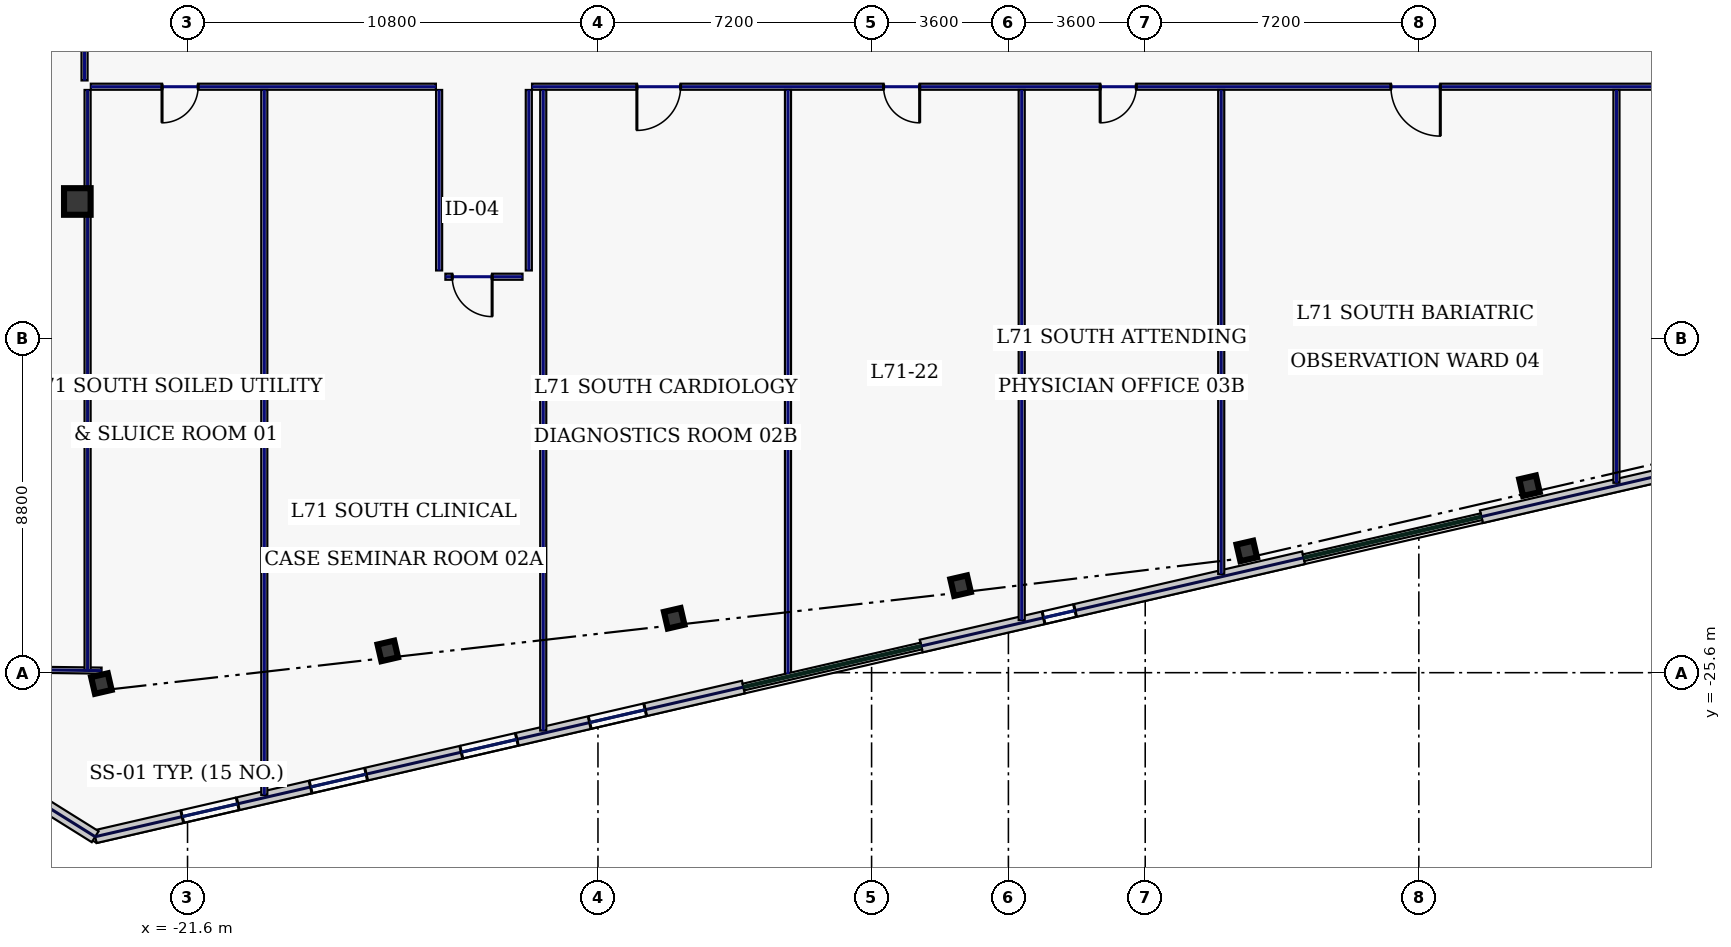
"""IFC4 building model, lengths in metres.
Left out: names, types, materials, properties, quantities, classifications, styles, units other than length and angle.
Written with IfcOpenShell. Run it as: python <this file> out.ifc"""

import sys

from ifc_helpers import new_model, si_unit, direction, frame, frame_2d, origin, origin_2d, place, context, subcontext, project, spatial, rectangle, hollow_rectangle, extrude, element, fill, save


model = new_model("IFC4")
c1 = context("Model", 3, precision=1e-05, world=origin(), true_north=direction((0.0, 1.0)))
c2 = subcontext(c1, "Body", "Model", "MODEL_VIEW")
j1 = project(units=[si_unit("LENGTHUNIT", "METRE"), si_unit("PLANEANGLEUNIT", "RADIAN")], contexts=[c1])
p1 = place(None, origin())
s1 = spatial("IfcSite", under=j1, at=p1, CompositionType="ELEMENT")
p2 = place(p1, origin())
s2 = spatial("IfcBuilding", under=s1, at=p2, CompositionType="ELEMENT")
p3 = place(p2, frame((0.0, 0.0, 305.0)))
s3 = spatial("IfcBuildingStorey", under=s2, at=p3, CompositionType="ELEMENT", Elevation=305.0)
p4 = place(p3, frame((-24.5, -13.2, 0.0), z_axis=(0.0, 0.0, 1.0), x_axis=(1.0, 0.0, 0.0)))
e1 = element("IfcColumn", 1, at=p4, inside=s3, PredefinedType="COLUMN", context=c2, shape_type="SweptSolid", body=[
    extrude(hollow_rectangle(XDim=0.7, YDim=0.7, WallThickness=0.032, at=origin_2d()), origin(), (0.0, 0.0, 1.0), 3.74),
])
for number, where, z_axis, x_axis in (
    (2, (-23.867, -25.886, 0.0), (0.0, 0.0, 1.0), (0.974, 0.225, 0.0)),
    (3, (-16.33, -25.027, 0.0), (0.0, 0.0, 1.0), (0.974, 0.225, 0.0)),
    (4, (-8.794, -24.168, 0.0), (0.0, 0.0, 1.0), (0.974, 0.225, 0.0)),
    (5, (-1.258, -23.31, 0.0), (0.0, 0.0, 1.0), (0.974, 0.225, 0.0)),
    (6, (6.273, -22.397, 0.0), (0.0, 0.0, 1.0), (0.974, 0.225, 0.0)),
    (7, (13.711, -20.68, 0.0), (0.0, 0.0, 1.0), (0.974, 0.225, 0.0)),
):
    element("IfcColumn", number, at=place(p3, frame(where, z_axis=z_axis, x_axis=x_axis)), inside=s3, PredefinedType="COLUMN", context=c2, shape_type="SweptSolid", body=[
        extrude(hollow_rectangle(XDim=0.45, YDim=0.45, WallThickness=0.022, at=origin_2d()), origin(), (0.0, 0.0, 1.0), 3.74),
    ])
p5 = place(p3, frame((-24.03, -29.916, 0.0), z_axis=(0.0, 0.0, 1.0), x_axis=(0.974370978061, 0.224947098473, 0.0)))
e8 = element("IfcWall", 8, at=p5, inside=s3, PredefinedType="STANDARD", context=c2, shape_type="SweptSolid", body=[
    extrude(rectangle(XDim=17.506, YDim=0.34, at=frame_2d((8.753, 0.0))), origin(), (0.0, 0.0, 1.0), 3.74),
])
p6 = place(p5, frame((2.35, 0.0, 0.9)))
e9 = element("IfcOpeningElement", 9, at=p6, cuts=e8, PredefinedType="OPENING", context=c2, shape_type="SweptSolid", body=[
    extrude(rectangle(XDim=1.5, YDim=2.0, at=frame_2d((0.75, 1.0))), frame((0.0, 0.18, 0.0), z_axis=(0.0, -1.0, 0.0), x_axis=(1.0, 0.0, 0.0)), (0.0, 0.0, 1.0), 0.36),
])
p7 = place(p5, frame((5.817, 0.0, 0.9)))
e10 = element("IfcOpeningElement", 10, at=p7, cuts=e8, PredefinedType="OPENING", context=c2, shape_type="SweptSolid", body=[
    extrude(rectangle(XDim=1.5, YDim=2.0, at=frame_2d((0.75, 1.0))), frame((0.0, 0.18, 0.0), z_axis=(0.0, -1.0, 0.0), x_axis=(1.0, 0.0, 0.0)), (0.0, 0.0, 1.0), 0.36),
])
p8 = place(p5, frame((9.886, 0.0, 0.9)))
e11 = element("IfcOpeningElement", 11, at=p8, cuts=e8, PredefinedType="OPENING", context=c2, shape_type="SweptSolid", body=[
    extrude(rectangle(XDim=1.5, YDim=2.0, at=frame_2d((0.75, 1.0))), frame((0.0, 0.18, 0.0), z_axis=(0.0, -1.0, 0.0), x_axis=(1.0, 0.0, 0.0)), (0.0, 0.0, 1.0), 0.36),
])
p9 = place(p5, frame((13.353, 0.0, 0.9)))
e12 = element("IfcOpeningElement", 12, at=p9, cuts=e8, PredefinedType="OPENING", context=c2, shape_type="SweptSolid", body=[
    extrude(rectangle(XDim=1.5, YDim=2.0, at=frame_2d((0.75, 1.0))), frame((0.0, 0.18, 0.0), z_axis=(0.0, -1.0, 0.0), x_axis=(1.0, 0.0, 0.0)), (0.0, 0.0, 1.0), 0.36),
])
p10 = place(p3, frame((-2.295, -24.898, 0.0), z_axis=(0.0, 0.0, 1.0), x_axis=(0.974370872906, 0.224947553958, 0.0)))
e13 = element("IfcWall", 13, at=p10, inside=s3, PredefinedType="STANDARD", context=c2, shape_type="SweptSolid", body=[
    extrude(rectangle(XDim=10.328, YDim=0.34, at=frame_2d((5.164, 0.0))), origin(), (0.0, 0.0, 1.0), 3.74),
])
p11 = place(p10, frame((3.305, 0.0, 0.9)))
e14 = element("IfcOpeningElement", 14, at=p11, cuts=e13, PredefinedType="OPENING", context=c2, shape_type="SweptSolid", body=[
    extrude(rectangle(XDim=0.85, YDim=1.85, at=frame_2d((0.425, 0.925))), frame((0.0, 0.18, 0.0), z_axis=(0.0, -1.0, 0.0), x_axis=(1.0, 0.0, 0.0)), (0.0, 0.0, 1.0), 0.36),
])
p12 = place(p3, frame((12.445, -21.495, 0.0), z_axis=(0.0, 0.0, 1.0), x_axis=(0.974369392164, 0.224953967767, 0.0)))
e15 = element("IfcWall", 15, at=p12, inside=s3, PredefinedType="STANDARD", context=c2, shape_type="SweptSolid", body=[
    extrude(rectangle(XDim=17.366, YDim=0.34, at=frame_2d((8.683, 0.0))), origin(), (0.0, 0.0, 1.0), 3.74),
])
p13 = place(p12, frame((6.19, 0.0, 0.22)))
e16 = element("IfcOpeningElement", 16, at=p13, cuts=e15, PredefinedType="OPENING", context=c2, shape_type="SweptSolid", body=[
    extrude(rectangle(XDim=1.6, YDim=1.2, at=frame_2d((0.8, 0.6))), frame((0.0, 0.18, 0.0), z_axis=(0.0, -1.0, 0.0), x_axis=(1.0, 0.0, 0.0)), (0.0, 0.0, 1.0), 0.36),
])
p14 = place(p12, frame((13.825, 0.0, 0.22)))
e17 = element("IfcOpeningElement", 17, at=p14, cuts=e15, PredefinedType="OPENING", context=c2, shape_type="SweptSolid", body=[
    extrude(rectangle(XDim=1.6, YDim=1.2, at=frame_2d((0.8, 0.6))), frame((0.0, 0.18, 0.0), z_axis=(0.0, -1.0, 0.0), x_axis=(1.0, 0.0, 0.0)), (0.0, 0.0, 1.0), 0.36),
])
p15 = place(p3, frame((-29.343, -26.596, 0.0), z_axis=(0.0, 0.0, 1.0), x_axis=(0.848037708252, -0.529935887993, 0.0)))
e18 = element("IfcWall", 18, at=p15, inside=s3, PredefinedType="STANDARD", context=c2, shape_type="SweptSolid", body=[
    extrude(rectangle(XDim=6.265, YDim=0.34, at=frame_2d((3.133, 0.0))), origin(), (0.0, 0.0, 1.0), 3.74),
])
p16 = place(p3, frame((-28.994, -25.479, 0.0), z_axis=(0.0, 0.0, 1.0), x_axis=(0.999915052546, -0.01303409726, 0.0)))
e19 = element("IfcWall", 19, at=p16, inside=s3, PredefinedType="PARTITIONING", context=c2, shape_type="SweptSolid", body=[
    extrude(rectangle(XDim=5.132, YDim=0.16, at=frame_2d((2.566, 0.0))), origin(), (0.0, 0.0, 1.0), 1.535),
])
p17 = place(p3, frame((-24.31, -10.015, 0.0), z_axis=(0.0, 0.0, 1.0), x_axis=(0.0, 1.0, 0.0)))
e20 = element("IfcWall", 20, at=p17, inside=s3, PredefinedType="PARTITIONING", context=c2, shape_type="SweptSolid", body=[
    extrude(rectangle(XDim=20.13, YDim=0.16, at=frame_2d((10.065, 0.0))), origin(), (0.0, 0.0, 1.0), 3.74),
])
p18 = place(p17, frame((2.169, 0.0, 0.0)))
e21 = element("IfcOpeningElement", 21, at=p18, cuts=e20, PredefinedType="OPENING", context=c2, shape_type="SweptSolid", body=[
    extrude(rectangle(XDim=0.95, YDim=2.2, at=frame_2d((0.475, 1.1))), frame((0.0, 0.09, 0.0), z_axis=(0.0, -1.0, 0.0), x_axis=(1.0, 0.0, 0.0)), (0.0, 0.0, 1.0), 0.18),
])
p19 = place(p17, frame((7.025, 0.0, 0.0)))
e22 = element("IfcOpeningElement", 22, at=p19, cuts=e20, PredefinedType="OPENING", context=c2, shape_type="SweptSolid", body=[
    extrude(rectangle(XDim=0.95, YDim=2.2, at=frame_2d((0.475, 1.1))), frame((0.0, 0.09, 0.0), z_axis=(0.0, -1.0, 0.0), x_axis=(1.0, 0.0, 0.0)), (0.0, 0.0, 1.0), 0.18),
])
p20 = place(p17, frame((12.225, 0.0, 0.0)))
e23 = element("IfcOpeningElement", 23, at=p20, cuts=e20, PredefinedType="OPENING", context=c2, shape_type="SweptSolid", body=[
    extrude(rectangle(XDim=0.95, YDim=2.2, at=frame_2d((0.475, 1.1))), frame((0.0, 0.09, 0.0), z_axis=(0.0, -1.0, 0.0), x_axis=(1.0, 0.0, 0.0)), (0.0, 0.0, 1.0), 0.18),
])
p21 = place(p17, frame((17.131, 0.0, 0.0)))
e24 = element("IfcOpeningElement", 24, at=p21, cuts=e20, PredefinedType="OPENING", context=c2, shape_type="SweptSolid", body=[
    extrude(rectangle(XDim=0.95, YDim=2.2, at=frame_2d((0.475, 1.1))), frame((0.0, 0.09, 0.0), z_axis=(0.0, -1.0, 0.0), x_axis=(1.0, 0.0, 0.0)), (0.0, 0.0, 1.0), 0.18),
])
p22 = place(p3, frame((24.145, -10.18, 0.0), z_axis=(0.0, 0.0, 1.0), x_axis=(-1.0, 0.0, 0.0)))
e25 = element("IfcWall", 25, at=p22, inside=s3, PredefinedType="PARTITIONING", context=c2, shape_type="SweptSolid", body=[
    extrude(rectangle(XDim=36.68, YDim=0.16, at=frame_2d((18.34, 0.0))), origin(), (0.0, 0.0, 1.0), 3.74),
])
p23 = place(p22, frame((32.771, 0.0, 0.0)))
e26 = element("IfcOpeningElement", 26, at=p23, cuts=e25, PredefinedType="OPENING", context=c2, shape_type="SweptSolid", body=[
    extrude(rectangle(XDim=1.15, YDim=2.2, at=frame_2d((0.575, 1.1))), frame((0.0, 0.09, 0.0), z_axis=(0.0, -1.0, 0.0), x_axis=(1.0, 0.0, 0.0)), (0.0, 0.0, 1.0), 0.18),
])
p24 = place(p22, frame((26.48, 0.0, 0.0)))
e27 = element("IfcOpeningElement", 27, at=p24, cuts=e25, PredefinedType="OPENING", context=c2, shape_type="SweptSolid", body=[
    extrude(rectangle(XDim=0.95, YDim=2.2, at=frame_2d((0.475, 1.1))), frame((0.0, 0.09, 0.0), z_axis=(0.0, -1.0, 0.0), x_axis=(1.0, 0.0, 0.0)), (0.0, 0.0, 1.0), 0.18),
])
p25 = place(p22, frame((20.78, 0.0, 0.0)))
e28 = element("IfcOpeningElement", 28, at=p25, cuts=e25, PredefinedType="OPENING", context=c2, shape_type="SweptSolid", body=[
    extrude(rectangle(XDim=0.95, YDim=2.2, at=frame_2d((0.475, 1.1))), frame((0.0, 0.09, 0.0), z_axis=(0.0, -1.0, 0.0), x_axis=(1.0, 0.0, 0.0)), (0.0, 0.0, 1.0), 0.18),
])
p26 = place(p22, frame((12.78, 0.0, 0.0)))
e29 = element("IfcOpeningElement", 29, at=p26, cuts=e25, PredefinedType="OPENING", context=c2, shape_type="SweptSolid", body=[
    extrude(rectangle(XDim=1.3, YDim=2.2, at=frame_2d((0.65, 1.1))), frame((0.0, 0.09, 0.0), z_axis=(0.0, -1.0, 0.0), x_axis=(1.0, 0.0, 0.0)), (0.0, 0.0, 1.0), 0.18),
])
p27 = place(p22, frame((3.659, 0.0, 0.0)))
e30 = element("IfcOpeningElement", 30, at=p27, cuts=e25, PredefinedType="OPENING", context=c2, shape_type="SweptSolid", body=[
    extrude(rectangle(XDim=1.3, YDim=2.2, at=frame_2d((0.65, 1.1))), frame((0.0, 0.09, 0.0), z_axis=(0.0, -1.0, 0.0), x_axis=(1.0, 0.0, 0.0)), (0.0, 0.0, 1.0), 0.18),
])
p28 = place(p3, frame((-12.62, -10.265, 0.0), z_axis=(0.0, 0.0, 1.0), x_axis=(0.0, -1.0, 0.0)))
e31 = element("IfcWall", 31, at=p28, inside=s3, PredefinedType="PARTITIONING", context=c2, shape_type="SweptSolid", body=[
    extrude(rectangle(XDim=4.75, YDim=0.16, at=frame_2d((2.375, 0.0))), origin(), (0.0, 0.0, 1.0), 3.74),
])
p29 = place(p3, frame((-12.785, -15.18, 0.0), z_axis=(0.0, 0.0, 1.0), x_axis=(-1.0, 0.0, 0.0)))
e32 = element("IfcWall", 32, at=p29, inside=s3, PredefinedType="PARTITIONING", context=c2, shape_type="SweptSolid", body=[
    extrude(rectangle(XDim=2.03, YDim=0.16, at=frame_2d((1.015, 0.0))), origin(), (0.0, 0.0, 1.0), 3.74),
])
p30 = place(p29, frame((0.8, 0.0, 0.0)))
e33 = element("IfcOpeningElement", 33, at=p30, cuts=e32, PredefinedType="OPENING", context=c2, shape_type="SweptSolid", body=[
    extrude(rectangle(XDim=1.05, YDim=2.2, at=frame_2d((0.525, 1.1))), frame((0.0, 0.09, 0.0), z_axis=(0.0, -1.0, 0.0), x_axis=(1.0, 0.0, 0.0)), (0.0, 0.0, 1.0), 0.18),
])
p31 = place(p3, frame((-14.98, -15.015, 0.0), z_axis=(0.0, 0.0, 1.0), x_axis=(0.0, 1.0, 0.0)))
e34 = element("IfcWall", 34, at=p31, inside=s3, PredefinedType="PARTITIONING", context=c2, shape_type="SweptSolid", body=[
    extrude(rectangle(XDim=4.75, YDim=0.16, at=frame_2d((2.375, 0.0))), origin(), (0.0, 0.0, 1.0), 3.74),
])
p32 = place(p3, frame((-15.065, -10.18, 0.0), z_axis=(0.0, 0.0, 1.0), x_axis=(-1.0, 0.0, 0.0)))
e35 = element("IfcWall", 35, at=p32, inside=s3, PredefinedType="PARTITIONING", context=c2, shape_type="SweptSolid", body=[
    extrude(rectangle(XDim=9.08, YDim=0.16, at=frame_2d((4.54, 0.0))), origin(), (0.0, 0.0, 1.0), 3.74),
])
p33 = place(p32, frame((6.256, 0.0, 0.0)))
e36 = element("IfcOpeningElement", 36, at=p33, cuts=e35, PredefinedType="OPENING", context=c2, shape_type="SweptSolid", body=[
    extrude(rectangle(XDim=0.95, YDim=2.2, at=frame_2d((0.475, 1.1))), frame((0.0, 0.09, 0.0), z_axis=(0.0, -1.0, 0.0), x_axis=(1.0, 0.0, 0.0)), (0.0, 0.0, 1.0), 0.18),
])
p34 = place(p3, frame((-24.23, -25.536, 0.0), z_axis=(0.0, 0.0, 1.0), x_axis=(0.0, 1.0, 0.0)))
e37 = element("IfcWall", 37, at=p34, inside=s3, PredefinedType="PARTITIONING", context=c2, shape_type="SweptSolid", body=[
    extrude(rectangle(XDim=15.271, YDim=0.16, at=frame_2d((7.635, 0.0))), origin(), (0.0, 0.0, 1.0), 3.335),
])
p35 = place(p3, frame((-19.58, -28.817, 0.0), z_axis=(0.0, 0.0, 1.0), x_axis=(0.0, 1.0, 0.0)))
e38 = element("IfcWall", 38, at=p35, inside=s3, PredefinedType="PARTITIONING", context=c2, shape_type="SweptSolid", body=[
    extrude(rectangle(XDim=18.552, YDim=0.16, at=frame_2d((9.276, 0.0))), origin(), (0.0, 0.0, 1.0), 3.74),
])
p36 = place(p3, frame((-5.8, -25.636, 0.0), z_axis=(0.0, 0.0, 1.0), x_axis=(0.0, 1.0, 0.0)))
e39 = element("IfcWall", 39, at=p36, inside=s3, PredefinedType="PARTITIONING", context=c2, shape_type="SweptSolid", body=[
    extrude(rectangle(XDim=15.371, YDim=0.16, at=frame_2d((7.686, 0.0))), origin(), (0.0, 0.0, 1.0), 3.74),
])
p37 = place(p3, frame((5.6, -23.004, 0.0), z_axis=(0.0, 0.0, 1.0), x_axis=(0.0, 1.0, 0.0)))
e40 = element("IfcWall", 40, at=p37, inside=s3, PredefinedType="PARTITIONING", context=c2, shape_type="SweptSolid", body=[
    extrude(rectangle(XDim=12.739, YDim=0.16, at=frame_2d((6.37, 0.0))), origin(), (0.0, 0.0, 1.0), 3.335),
])
p38 = place(p3, frame((16.0, -20.603, 0.0), z_axis=(0.0, 0.0, 1.0), x_axis=(0.0, 1.0, 0.0)))
e41 = element("IfcWall", 41, at=p38, inside=s3, PredefinedType="PARTITIONING", context=c2, shape_type="SweptSolid", body=[
    extrude(rectangle(XDim=10.338, YDim=0.16, at=frame_2d((5.169, 0.0))), origin(), (0.0, 0.0, 1.0), 3.74),
])
p39 = place(p3, frame((-12.24, -27.123, 0.0), z_axis=(0.0, 0.0, 1.0), x_axis=(0.0, 1.0, 0.0)))
e42 = element("IfcWall", 42, at=p39, inside=s3, PredefinedType="PARTITIONING", context=c2, shape_type="SweptSolid", body=[
    extrude(rectangle(XDim=16.858, YDim=0.16, at=frame_2d((8.429, 0.0))), origin(), (0.0, 0.0, 1.0), 3.74),
])
p40 = place(p3, frame((0.35, -24.216, 0.0), z_axis=(0.0, 0.0, 1.0), x_axis=(0.0, 1.0, 0.0)))
e43 = element("IfcWall", 43, at=p40, inside=s3, PredefinedType="PARTITIONING", context=c2, shape_type="SweptSolid", body=[
    extrude(rectangle(XDim=13.951, YDim=0.16, at=frame_2d((6.976, 0.0))), origin(), (0.0, 0.0, 1.0), 3.74),
])
p41 = place(p6, origin())
e44 = element("IfcWindow", 44, at=p41, inside=s3, PartitioningType="SINGLE_PANEL", PredefinedType="WINDOW", context=c2, shape_type="SweptSolid", body=[
    extrude(rectangle(XDim=1.5, YDim=2.0, at=frame_2d((0.75, 1.0))), frame((0.0, 0.03, 0.0), z_axis=(0.0, -1.0, 0.0), x_axis=(1.0, 0.0, 0.0)), (0.0, 0.0, 1.0), 0.06),
])
fill(e9, e44)
p42 = place(p7, origin())
e45 = element("IfcWindow", 45, at=p42, inside=s3, PartitioningType="SINGLE_PANEL", PredefinedType="WINDOW", context=c2, shape_type="SweptSolid", body=[
    extrude(rectangle(XDim=1.5, YDim=2.0, at=frame_2d((0.75, 1.0))), frame((0.0, 0.03, 0.0), z_axis=(0.0, -1.0, 0.0), x_axis=(1.0, 0.0, 0.0)), (0.0, 0.0, 1.0), 0.06),
])
fill(e10, e45)
p43 = place(p8, origin())
e46 = element("IfcWindow", 46, at=p43, inside=s3, PartitioningType="SINGLE_PANEL", PredefinedType="WINDOW", context=c2, shape_type="SweptSolid", body=[
    extrude(rectangle(XDim=1.5, YDim=2.0, at=frame_2d((0.75, 1.0))), frame((0.0, 0.03, 0.0), z_axis=(0.0, -1.0, 0.0), x_axis=(1.0, 0.0, 0.0)), (0.0, 0.0, 1.0), 0.06),
])
fill(e11, e46)
p44 = place(p9, origin())
e47 = element("IfcWindow", 47, at=p44, inside=s3, PartitioningType="SINGLE_PANEL", PredefinedType="WINDOW", context=c2, shape_type="SweptSolid", body=[
    extrude(rectangle(XDim=1.5, YDim=2.0, at=frame_2d((0.75, 1.0))), frame((0.0, 0.03, 0.0), z_axis=(0.0, -1.0, 0.0), x_axis=(1.0, 0.0, 0.0)), (0.0, 0.0, 1.0), 0.06),
])
fill(e12, e47)
p45 = place(p11, origin())
e48 = element("IfcWindow", 48, at=p45, inside=s3, PartitioningType="SINGLE_PANEL", PredefinedType="WINDOW", context=c2, shape_type="SweptSolid", body=[
    extrude(rectangle(XDim=0.85, YDim=1.85, at=frame_2d((0.425, 0.925))), frame((0.0, 0.03, 0.0), z_axis=(0.0, -1.0, 0.0), x_axis=(1.0, 0.0, 0.0)), (0.0, 0.0, 1.0), 0.06),
])
fill(e14, e48)
p46 = place(p33, origin())
e49 = element("IfcDoor", 49, at=p46, inside=s3, OperationType="SINGLE_SWING_RIGHT", PredefinedType="DOOR", context=c2, shape_type="SweptSolid", body=[
    extrude(rectangle(XDim=0.95, YDim=2.2, at=frame_2d((0.475, 1.1))), frame((0.0, 0.025, 0.0), z_axis=(0.0, -1.0, 0.0), x_axis=(1.0, 0.0, 0.0)), (0.0, 0.0, 1.0), 0.05),
])
fill(e36, e49)
p47 = place(p30, origin())
e50 = element("IfcDoor", 50, at=p47, inside=s3, OperationType="SINGLE_SWING_LEFT", PredefinedType="DOOR", context=c2, shape_type="SweptSolid", body=[
    extrude(rectangle(XDim=1.05, YDim=2.2, at=frame_2d((0.525, 1.1))), frame((0.0, 0.025, 0.0), z_axis=(0.0, -1.0, 0.0), x_axis=(1.0, 0.0, 0.0)), (0.0, 0.0, 1.0), 0.05),
])
fill(e33, e50)
p48 = place(p23, origin())
e51 = element("IfcDoor", 51, at=p48, inside=s3, OperationType="SINGLE_SWING_RIGHT", PredefinedType="DOOR", context=c2, shape_type="SweptSolid", body=[
    extrude(rectangle(XDim=1.15, YDim=2.2, at=frame_2d((0.575, 1.1))), frame((0.0, 0.025, 0.0), z_axis=(0.0, -1.0, 0.0), x_axis=(1.0, 0.0, 0.0)), (0.0, 0.0, 1.0), 0.05),
])
fill(e26, e51)
p49 = place(p24, origin())
e52 = element("IfcDoor", 52, at=p49, inside=s3, OperationType="SINGLE_SWING_LEFT", PredefinedType="DOOR", context=c2, shape_type="SweptSolid", body=[
    extrude(rectangle(XDim=0.95, YDim=2.2, at=frame_2d((0.475, 1.1))), frame((0.0, 0.025, 0.0), z_axis=(0.0, -1.0, 0.0), x_axis=(1.0, 0.0, 0.0)), (0.0, 0.0, 1.0), 0.05),
])
fill(e27, e52)
p50 = place(p25, origin())
e53 = element("IfcDoor", 53, at=p50, inside=s3, OperationType="SINGLE_SWING_RIGHT", PredefinedType="DOOR", context=c2, shape_type="SweptSolid", body=[
    extrude(rectangle(XDim=0.95, YDim=2.2, at=frame_2d((0.475, 1.1))), frame((0.0, 0.025, 0.0), z_axis=(0.0, -1.0, 0.0), x_axis=(1.0, 0.0, 0.0)), (0.0, 0.0, 1.0), 0.05),
])
fill(e28, e53)
p51 = place(p26, origin())
e54 = element("IfcDoor", 54, at=p51, inside=s3, OperationType="SINGLE_SWING_LEFT", PredefinedType="DOOR", context=c2, shape_type="SweptSolid", body=[
    extrude(rectangle(XDim=1.3, YDim=2.2, at=frame_2d((0.65, 1.1))), frame((0.0, 0.025, 0.0), z_axis=(0.0, -1.0, 0.0), x_axis=(1.0, 0.0, 0.0)), (0.0, 0.0, 1.0), 0.05),
])
fill(e29, e54)
save(model, sys.argv[1])
